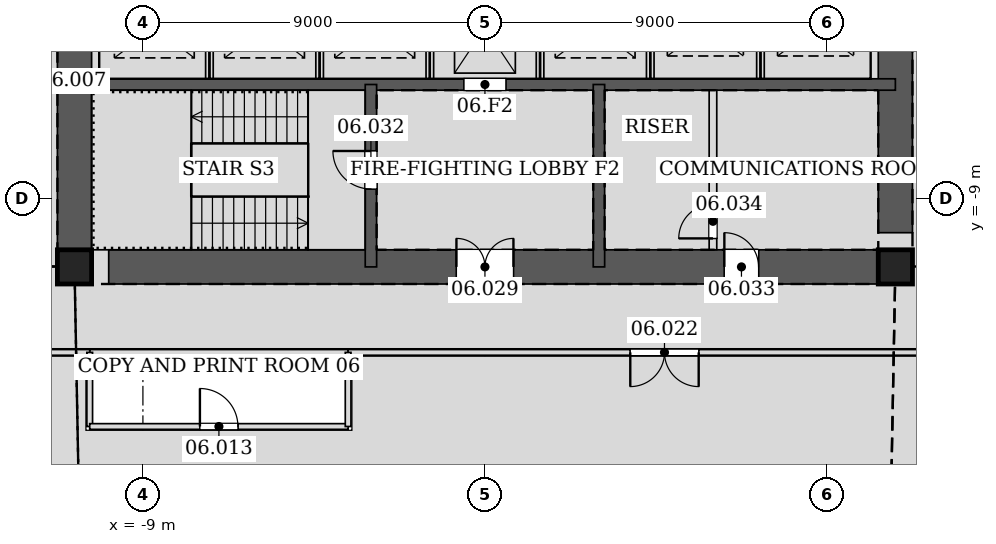
"""IFC4 building model, lengths in metres.
Left out: names, types, materials, properties, quantities, classifications, styles, units other than length and angle.
Written with IfcOpenShell. Run it as: python <this file> out.ifc"""

import sys

from ifc_helpers import new_model, si_unit, direction, frame, frame_2d, origin, origin_2d, place, context, subcontext, project, spatial, rectangle, hollow_rectangle, extrude, element, fill, save


model = new_model("IFC4")
c1 = context("Model", 3, precision=1e-05, world=origin(), true_north=direction((0.0, 1.0)))
c2 = subcontext(c1, "Body", "Model", "MODEL_VIEW")
j1 = project(units=[si_unit("LENGTHUNIT", "METRE"), si_unit("PLANEANGLEUNIT", "RADIAN")], contexts=[c1])
p1 = place(None, origin())
s1 = spatial("IfcSite", under=j1, at=p1, CompositionType="ELEMENT")
p2 = place(p1, origin())
s2 = spatial("IfcBuilding", under=s1, at=p2, CompositionType="ELEMENT")
p3 = place(p2, frame((0.0, 0.0, 33.0)))
s3 = spatial("IfcBuildingStorey", under=s2, at=p3, CompositionType="ELEMENT", Elevation=33.0)
for number, where, z_axis, x_axis in (
    (1, (-10.8, -10.8, 0.0), (0.0, 0.0, 1.0), (1.0, 0.0, 0.0)),
    (2, (10.8, -10.8, 0.0), (0.0, 0.0, 1.0), (1.0, 0.0, 0.0)),
):
    element("IfcColumn", number, at=place(p3, frame(where, z_axis=z_axis, x_axis=x_axis)), inside=s3, PredefinedType="COLUMN", context=c2, shape_type="SweptSolid", body=[
        extrude(hollow_rectangle(XDim=0.9, YDim=0.9, WallThickness=0.06, at=origin_2d()), origin(), (0.0, 0.0, 1.0), 4.2),
    ])
p4 = place(p3, frame((-10.8, -10.8, 0.0), z_axis=(0.0, 0.0, 1.0), x_axis=(1.0, 0.0, 0.0)))
e3 = element("IfcWall", 3, at=p4, inside=s3, PredefinedType="SOLIDWALL", context=c2, shape_type="SweptSolid", body=[
    extrude(rectangle(XDim=21.6, YDim=0.9, at=frame_2d((10.8, 0.0))), origin(), (0.0, 0.0, 1.0), 4.2),
])
p5 = place(p4, frame((10.05, 0.0, 0.0)))
e4 = element("IfcOpeningElement", 4, at=p5, cuts=e3, PredefinedType="OPENING", context=c2, shape_type="SweptSolid", body=[
    extrude(rectangle(XDim=1.5, YDim=2.1, at=frame_2d((0.75, 1.05))), frame((0.0, 0.46, 0.0), z_axis=(0.0, -1.0, 0.0), x_axis=(1.0, 0.0, 0.0)), (0.0, 0.0, 1.0), 0.92),
])
p6 = place(p4, frame((17.1, 0.0, 0.0)))
e5 = element("IfcOpeningElement", 5, at=p6, cuts=e3, PredefinedType="OPENING", context=c2, shape_type="SweptSolid", body=[
    extrude(rectangle(XDim=0.9, YDim=2.1, at=frame_2d((0.45, 1.05))), frame((0.0, 0.46, 0.0), z_axis=(0.0, -1.0, 0.0), x_axis=(1.0, 0.0, 0.0)), (0.0, 0.0, 1.0), 0.92),
])
p7 = place(p3, frame((10.8, -10.8, 0.0), z_axis=(0.0, 0.0, 1.0), x_axis=(0.0, 1.0, 0.0)))
e6 = element("IfcWall", 6, at=p7, inside=s3, PredefinedType="SOLIDWALL", context=c2, shape_type="SweptSolid", body=[
    extrude(rectangle(XDim=21.6, YDim=0.9, at=frame_2d((10.8, 0.0))), origin(), (0.0, 0.0, 1.0), 4.2),
])
p8 = place(p7, frame((11.7, 0.0, 0.0)))
e7 = element("IfcOpeningElement", 7, at=p8, cuts=e6, PredefinedType="OPENING", context=c2, shape_type="SweptSolid", body=[
    extrude(rectangle(XDim=1.2, YDim=2.1, at=frame_2d((0.6, 1.05))), frame((0.0, 0.46, 0.0), z_axis=(0.0, -1.0, 0.0), x_axis=(1.0, 0.0, 0.0)), (0.0, 0.0, 1.0), 0.92),
])
p9 = place(p7, frame((8.7, 0.0, 0.0)))
e8 = element("IfcOpeningElement", 8, at=p9, cuts=e6, PredefinedType="OPENING", context=c2, shape_type="SweptSolid", body=[
    extrude(rectangle(XDim=1.2, YDim=2.1, at=frame_2d((0.6, 1.05))), frame((0.0, 0.46, 0.0), z_axis=(0.0, -1.0, 0.0), x_axis=(1.0, 0.0, 0.0)), (0.0, 0.0, 1.0), 0.92),
])
p10 = place(p3, frame((-10.8, 10.8, 0.0), z_axis=(0.0, 0.0, 1.0), x_axis=(0.0, -1.0, 0.0)))
e9 = element("IfcWall", 9, at=p10, inside=s3, PredefinedType="SOLIDWALL", context=c2, shape_type="SweptSolid", body=[
    extrude(rectangle(XDim=21.6, YDim=0.9, at=frame_2d((10.8, 0.0))), origin(), (0.0, 0.0, 1.0), 4.2),
])
p11 = place(p10, frame((8.7, 0.0, 0.0)))
e10 = element("IfcOpeningElement", 10, at=p11, cuts=e9, PredefinedType="OPENING", context=c2, shape_type="SweptSolid", body=[
    extrude(rectangle(XDim=1.2, YDim=2.1, at=frame_2d((0.6, 1.05))), frame((0.0, 0.46, 0.0), z_axis=(0.0, -1.0, 0.0), x_axis=(1.0, 0.0, 0.0)), (0.0, 0.0, 1.0), 0.92),
])
p12 = place(p10, frame((11.7, 0.0, 0.0)))
e11 = element("IfcOpeningElement", 11, at=p12, cuts=e9, PredefinedType="OPENING", context=c2, shape_type="SweptSolid", body=[
    extrude(rectangle(XDim=1.2, YDim=2.1, at=frame_2d((0.6, 1.05))), frame((0.0, 0.46, 0.0), z_axis=(0.0, -1.0, 0.0), x_axis=(1.0, 0.0, 0.0)), (0.0, 0.0, 1.0), 0.92),
])
p13 = place(p3, frame((-10.8, -6.0, 0.0), z_axis=(0.0, 0.0, 1.0), x_axis=(1.0, 0.0, 0.0)))
e12 = element("IfcWall", 12, at=p13, inside=s3, PredefinedType="SOLIDWALL", context=c2, shape_type="SweptSolid", body=[
    extrude(rectangle(XDim=21.6, YDim=0.3, at=frame_2d((10.8, 0.0))), origin(), (0.0, 0.0, 1.0), 4.2),
])
p14 = place(p13, frame((10.25, 0.0, 0.0)))
e13 = element("IfcOpeningElement", 13, at=p14, cuts=e12, PredefinedType="OPENING", context=c2, shape_type="SweptSolid", body=[
    extrude(rectangle(XDim=1.1, YDim=2.1, at=frame_2d((0.55, 1.05))), frame((0.0, 0.16, 0.0), z_axis=(0.0, -1.0, 0.0), x_axis=(1.0, 0.0, 0.0)), (0.0, 0.0, 1.0), 0.32),
])
p15 = place(p3, frame((-3.0, -6.0, 0.0), z_axis=(0.0, 0.0, 1.0), x_axis=(0.0, -1.0, 0.0)))
e14 = element("IfcWall", 14, at=p15, inside=s3, PredefinedType="SOLIDWALL", context=c2, shape_type="SweptSolid", body=[
    extrude(rectangle(XDim=4.8, YDim=0.3, at=frame_2d((2.4, 0.0))), origin(), (0.0, 0.0, 1.0), 4.2),
])
p16 = place(p15, frame((1.75, 0.0, 0.0)))
e15 = element("IfcOpeningElement", 15, at=p16, cuts=e14, PredefinedType="OPENING", context=c2, shape_type="SweptSolid", body=[
    extrude(rectangle(XDim=1.0, YDim=2.1, at=frame_2d((0.5, 1.05))), frame((0.0, 0.16, 0.0), z_axis=(0.0, -1.0, 0.0), x_axis=(1.0, 0.0, 0.0)), (0.0, 0.0, 1.0), 0.32),
])
p17 = place(p3, frame((3.0, -6.0, 0.0), z_axis=(0.0, 0.0, 1.0), x_axis=(0.0, -1.0, 0.0)))
e16 = element("IfcWall", 16, at=p17, inside=s3, PredefinedType="SOLIDWALL", context=c2, shape_type="SweptSolid", body=[
    extrude(rectangle(XDim=4.8, YDim=0.3, at=frame_2d((2.4, 0.0))), origin(), (0.0, 0.0, 1.0), 4.2),
])
p18 = place(p3, frame((-10.401, -13.05, 0.0), z_axis=(0.0, 0.0, 1.0), x_axis=(1.0, 0.0, 0.0)))
e17 = element("IfcWall", 17, at=p18, inside=s3, PredefinedType="PARTITIONING", context=c2, shape_type="SweptSolid", body=[
    extrude(rectangle(XDim=6.802, YDim=0.15, at=frame_2d((3.401, 0.0))), origin(), (0.0, 0.0, 1.0), 4.035),
])
p19 = place(p3, frame((-13.05, -13.05, 0.0), z_axis=(0.0, 0.0, 1.0), x_axis=(1.0, 0.0, 0.0)))
e18 = element("IfcWall", 18, at=p19, inside=s3, PredefinedType="PARTITIONING", context=c2, shape_type="SweptSolid", body=[
    extrude(rectangle(XDim=2.651, YDim=0.15, at=frame_2d((1.326, 0.0))), origin(), (0.0, 0.0, 1.0), 3.065),
])
p20 = place(p3, frame((-3.601, -13.05, 0.0), z_axis=(0.0, 0.0, 1.0), x_axis=(1.0, 0.0, 0.0)))
e19 = element("IfcWall", 19, at=p20, inside=s3, PredefinedType="PARTITIONING", context=c2, shape_type="SweptSolid", body=[
    extrude(rectangle(XDim=16.651, YDim=0.15, at=frame_2d((8.326, 0.0))), origin(), (0.0, 0.0, 1.0), 2.984),
])
p21 = place(p20, frame((7.426, 0.0, 0.0)))
e20 = element("IfcOpeningElement", 20, at=p21, cuts=e19, PredefinedType="OPENING", context=c2, shape_type="SweptSolid", body=[
    extrude(rectangle(XDim=1.8, YDim=2.4, at=frame_2d((0.9, 1.2))), frame((0.0, 0.085, 0.0), z_axis=(0.0, -1.0, 0.0), x_axis=(1.0, 0.0, 0.0)), (0.0, 0.0, 1.0), 0.17),
])
p22 = place(p3, frame((-10.4, -13.05, 0.0), z_axis=(0.0, 0.0, 1.0), x_axis=(0.0, -1.0, 0.0)))
e21 = element("IfcWall", 21, at=p22, inside=s3, PredefinedType="PARTITIONING", context=c2, shape_type="SweptSolid", body=[
    extrude(rectangle(XDim=1.95, YDim=0.15, at=frame_2d((0.975, 0.0))), origin(), (0.0, 0.0, 1.0), 3.426),
])
p23 = place(p3, frame((-10.4, -15.0, 0.0), z_axis=(0.0, 0.0, 1.0), x_axis=(1.0, 0.0, 0.0)))
e22 = element("IfcWall", 22, at=p23, inside=s3, PredefinedType="PARTITIONING", context=c2, shape_type="SweptSolid", body=[
    extrude(rectangle(XDim=6.8, YDim=0.15, at=frame_2d((3.4, 0.0))), origin(), (0.0, 0.0, 1.0), 4.035),
])
p24 = place(p23, frame((2.9, 0.0, 0.0)))
e23 = element("IfcOpeningElement", 23, at=p24, cuts=e22, PredefinedType="OPENING", context=c2, shape_type="SweptSolid", body=[
    extrude(rectangle(XDim=1.0, YDim=2.1, at=frame_2d((0.5, 1.05))), frame((0.0, 0.085, 0.0), z_axis=(0.0, -1.0, 0.0), x_axis=(1.0, 0.0, 0.0)), (0.0, 0.0, 1.0), 0.17),
])
p25 = place(p3, frame((-3.6, -15.0, 0.0), z_axis=(0.0, 0.0, 1.0), x_axis=(0.0, 1.0, 0.0)))
e24 = element("IfcWall", 24, at=p25, inside=s3, PredefinedType="PARTITIONING", context=c2, shape_type="SweptSolid", body=[
    extrude(rectangle(XDim=1.95, YDim=0.15, at=frame_2d((0.975, 0.0))), origin(), (0.0, 0.0, 1.0), 3.426),
])
for number, where, z_axis, x_axis in (
    (25, (-7.25, -5.85, 0.0), (0.0, 0.0, 1.0), (0.0, 1.0, 0.0)),
    (26, (-4.35, -5.85, 0.0), (0.0, 0.0, 1.0), (0.0, 1.0, 0.0)),
    (27, (-1.45, -5.85, 0.0), (0.0, 0.0, 1.0), (0.0, 1.0, 0.0)),
    (28, (1.45, -5.85, 0.0), (0.0, 0.0, 1.0), (0.0, 1.0, 0.0)),
    (29, (4.35, -5.85, 0.0), (0.0, 0.0, 1.0), (0.0, 1.0, 0.0)),
    (30, (7.25, -5.85, 0.0), (0.0, 0.0, 1.0), (0.0, 1.0, 0.0)),
):
    element("IfcWall", number, at=place(p3, frame(where, z_axis=z_axis, x_axis=x_axis)), inside=s3, PredefinedType="PARTITIONING", context=c2, shape_type="SweptSolid", body=[
        extrude(rectangle(XDim=2.7, YDim=0.2, at=frame_2d((1.35, 0.0))), origin(), (0.0, 0.0, 1.0), 4.2),
    ])
p26 = place(p3, frame((6.0, -10.35, 0.0), z_axis=(0.0, 0.0, 1.0), x_axis=(0.0, 1.0, 0.0)))
e31 = element("IfcWall", 31, at=p26, inside=s3, PredefinedType="PARTITIONING", context=c2, shape_type="SweptSolid", body=[
    extrude(rectangle(XDim=4.2, YDim=0.2, at=frame_2d((2.1, 0.0))), origin(), (0.0, 0.0, 1.0), 4.035),
])
p27 = place(p26, frame((0.3, 0.0, 0.0)))
e32 = element("IfcOpeningElement", 32, at=p27, cuts=e31, PredefinedType="OPENING", context=c2, shape_type="SweptSolid", body=[
    extrude(rectangle(XDim=0.9, YDim=2.1, at=frame_2d((0.45, 1.05))), frame((0.0, 0.11, 0.0), z_axis=(0.0, -1.0, 0.0), x_axis=(1.0, 0.0, 0.0)), (0.0, 0.0, 1.0), 0.22),
])
p28 = place(p24, origin())
e33 = element("IfcDoor", 33, at=p28, inside=s3, OperationType="SINGLE_SWING_LEFT", PredefinedType="DOOR", context=c2, shape_type="SweptSolid", body=[
    extrude(rectangle(XDim=1.0, YDim=2.1, at=frame_2d((0.5, 1.05))), frame((0.0, 0.025, 0.0), z_axis=(0.0, -1.0, 0.0), x_axis=(1.0, 0.0, 0.0)), (0.0, 0.0, 1.0), 0.05),
])
fill(e23, e33)
p29 = place(p21, frame((1.8, 0.0, 0.0), z_axis=(0.0, 0.0, 1.0), x_axis=(-1.0, 0.0, 0.0)))
e34 = element("IfcDoor", 34, at=p29, inside=s3, OperationType="DOUBLE_DOOR_SINGLE_SWING", PredefinedType="DOOR", context=c2, shape_type="SweptSolid", body=[
    extrude(rectangle(XDim=1.8, YDim=2.4, at=frame_2d((0.9, 1.2))), frame((0.0, 0.025, 0.0), z_axis=(0.0, -1.0, 0.0), x_axis=(1.0, 0.0, 0.0)), (0.0, 0.0, 1.0), 0.05),
])
fill(e20, e34)
p30 = place(p5, origin())
e35 = element("IfcDoor", 35, at=p30, inside=s3, OperationType="DOUBLE_DOOR_SINGLE_SWING", PredefinedType="DOOR", context=c2, shape_type="SweptSolid", body=[
    extrude(rectangle(XDim=1.5, YDim=2.1, at=frame_2d((0.75, 1.05))), frame((0.0, 0.025, 0.0), z_axis=(0.0, -1.0, 0.0), x_axis=(1.0, 0.0, 0.0)), (0.0, 0.0, 1.0), 0.05),
])
fill(e4, e35)
p31 = place(p16, frame((1.0, 0.0, 0.0), z_axis=(0.0, 0.0, 1.0), x_axis=(-1.0, 0.0, 0.0)))
e36 = element("IfcDoor", 36, at=p31, inside=s3, OperationType="SINGLE_SWING_RIGHT", PredefinedType="DOOR", context=c2, shape_type="SweptSolid", body=[
    extrude(rectangle(XDim=1.0, YDim=2.1, at=frame_2d((0.5, 1.05))), frame((0.0, 0.025, 0.0), z_axis=(0.0, -1.0, 0.0), x_axis=(1.0, 0.0, 0.0)), (0.0, 0.0, 1.0), 0.05),
])
fill(e15, e36)
p32 = place(p6, origin())
e37 = element("IfcDoor", 37, at=p32, inside=s3, OperationType="SINGLE_SWING_LEFT", PredefinedType="DOOR", context=c2, shape_type="SweptSolid", body=[
    extrude(rectangle(XDim=0.9, YDim=2.1, at=frame_2d((0.45, 1.05))), frame((0.0, 0.025, 0.0), z_axis=(0.0, -1.0, 0.0), x_axis=(1.0, 0.0, 0.0)), (0.0, 0.0, 1.0), 0.05),
])
fill(e5, e37)
p33 = place(p27, origin())
e38 = element("IfcDoor", 38, at=p33, inside=s3, OperationType="SINGLE_SWING_LEFT", PredefinedType="DOOR", context=c2, shape_type="SweptSolid", body=[
    extrude(rectangle(XDim=0.9, YDim=2.1, at=frame_2d((0.45, 1.05))), frame((0.0, 0.025, 0.0), z_axis=(0.0, -1.0, 0.0), x_axis=(1.0, 0.0, 0.0)), (0.0, 0.0, 1.0), 0.05),
])
fill(e32, e38)
p34 = place(p14, origin())
e39 = element("IfcDoor", 39, at=p34, inside=s3, OperationType="DOUBLE_DOOR_SLIDING", PredefinedType="DOOR", context=c2, shape_type="SweptSolid", body=[
    extrude(rectangle(XDim=1.1, YDim=2.1, at=frame_2d((0.55, 1.05))), frame((0.0, 0.025, 0.0), z_axis=(0.0, -1.0, 0.0), x_axis=(1.0, 0.0, 0.0)), (0.0, 0.0, 1.0), 0.05),
])
fill(e13, e39)
save(model, sys.argv[1])
